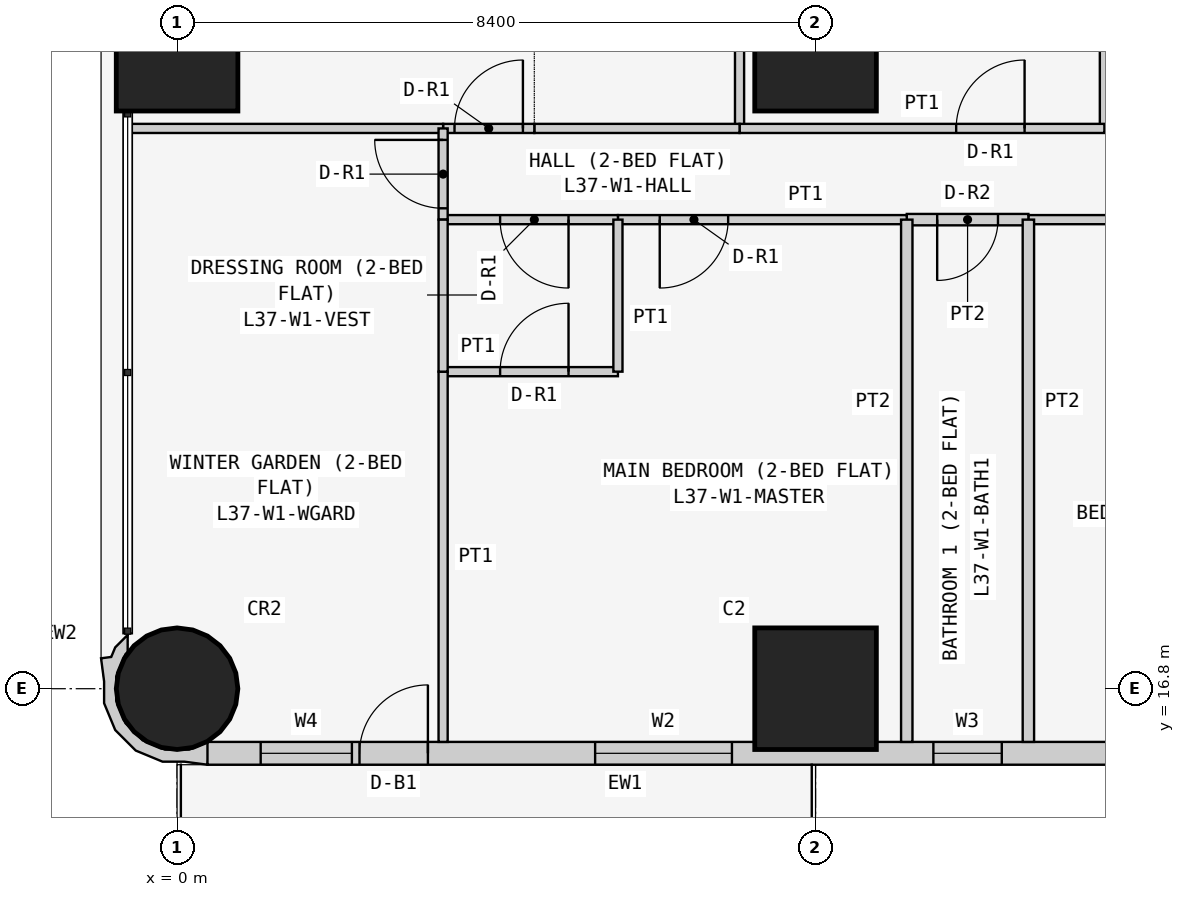
"""IFC4 building model, lengths in metres.
Left out: names, types, materials, properties, quantities, classifications, styles, units other than length and angle.
Written with IfcOpenShell. Run it as: python <this file> out.ifc"""

import sys

from ifc_helpers import new_model, si_unit, direction, frame, frame_2d, origin, origin_2d, place, context, subcontext, project, spatial, polyline, rectangle, circle, outline, extrude, element, fill, save


model = new_model("IFC4")
c1 = context("Model", 3, precision=1e-05, world=origin(), true_north=direction((0.0, 1.0)))
c2 = subcontext(c1, "Body", "Model", "MODEL_VIEW")
j1 = project(units=[si_unit("LENGTHUNIT", "METRE"), si_unit("PLANEANGLEUNIT", "RADIAN")], contexts=[c1])
p1 = place(None, origin())
s1 = spatial("IfcSite", under=j1, at=p1, CompositionType="ELEMENT")
p2 = place(p1, origin())
s2 = spatial("IfcBuilding", under=s1, at=p2, CompositionType="ELEMENT")
p3 = place(p2, frame((0.0, 0.0, 144.9)))
s3 = spatial("IfcBuildingStorey", under=s2, at=p3, CompositionType="ELEMENT", Elevation=144.9)
p4 = place(p3, frame((0.0, 16.8, 0.0), z_axis=(0.0, 0.0, 1.0), x_axis=(1.0, 0.0, 0.0)))
e1 = element("IfcColumn", 1, at=p4, inside=s3, PredefinedType="COLUMN", context=c2, shape_type="SweptSolid", body=[
    extrude(circle(Radius=0.8, at=origin_2d()), origin(), (0.0, 0.0, 1.0), 3.6),
])
for number, where, z_axis, x_axis in (
    (2, (0.0, 25.2, 0.0), (0.0, 0.0, 1.0), (1.0, 0.0, 0.0)),
    (3, (8.4, 16.8, 0.0), (0.0, 0.0, 1.0), (1.0, 0.0, 0.0)),
    (4, (8.4, 25.2, 0.0), (0.0, 0.0, 1.0), (1.0, 0.0, 0.0)),
):
    element("IfcColumn", number, at=place(p3, frame(where, z_axis=z_axis, x_axis=x_axis)), inside=s3, PredefinedType="COLUMN", context=c2, shape_type="SweptSolid", body=[
        extrude(rectangle(XDim=1.6, YDim=1.6, at=origin_2d()), origin(), (0.0, 0.0, 1.0), 3.6),
    ])
p5 = place(p3, frame((0.4, 15.95, 0.0), z_axis=(0.0, 0.0, 1.0), x_axis=(1.0, 0.0, 0.0)))
e5 = element("IfcWall", 5, at=p5, inside=s3, PredefinedType="SOLIDWALL", context=c2, shape_type="SweptSolid", body=[
    extrude(rectangle(XDim=15.7, YDim=0.3, at=frame_2d((7.85, 0.0))), origin(), (0.0, 0.0, 1.0), 3.45),
])
p6 = place(p5, frame((12.4, 0.0, 0.9)))
e6 = element("IfcOpeningElement", 6, at=p6, cuts=e5, PredefinedType="OPENING", context=c2, shape_type="SweptSolid", body=[
    extrude(rectangle(XDim=1.8, YDim=1.5, at=frame_2d((0.9, 0.75))), frame((0.0, 0.16, 0.0), z_axis=(0.0, -1.0, 0.0), x_axis=(1.0, 0.0, 0.0)), (0.0, 0.0, 1.0), 0.32),
])
p7 = place(p5, frame((9.55, 0.0, 1.5)))
e7 = element("IfcOpeningElement", 7, at=p7, cuts=e5, PredefinedType="OPENING", context=c2, shape_type="SweptSolid", body=[
    extrude(rectangle(XDim=0.9, YDim=0.7, at=frame_2d((0.45, 0.35))), frame((0.0, 0.16, 0.0), z_axis=(0.0, -1.0, 0.0), x_axis=(1.0, 0.0, 0.0)), (0.0, 0.0, 1.0), 0.32),
])
p8 = place(p5, frame((5.1, 0.0, 0.9)))
e8 = element("IfcOpeningElement", 8, at=p8, cuts=e5, PredefinedType="OPENING", context=c2, shape_type="SweptSolid", body=[
    extrude(rectangle(XDim=1.8, YDim=1.5, at=frame_2d((0.9, 0.75))), frame((0.0, 0.16, 0.0), z_axis=(0.0, -1.0, 0.0), x_axis=(1.0, 0.0, 0.0)), (0.0, 0.0, 1.0), 0.32),
])
p9 = place(p5, frame((2.0, 0.0, 0.0)))
e9 = element("IfcOpeningElement", 9, at=p9, cuts=e5, PredefinedType="OPENING", context=c2, shape_type="SweptSolid", body=[
    extrude(rectangle(XDim=0.9, YDim=2.4, at=frame_2d((0.45, 1.2))), frame((0.0, 0.16, 0.0), z_axis=(0.0, -1.0, 0.0), x_axis=(1.0, 0.0, 0.0)), (0.0, 0.0, 1.0), 0.32),
])
p10 = place(p5, frame((0.7, 0.0, 0.9)))
e10 = element("IfcOpeningElement", 10, at=p10, cuts=e5, PredefinedType="OPENING", context=c2, shape_type="SweptSolid", body=[
    extrude(rectangle(XDim=1.2, YDim=1.5, at=frame_2d((0.6, 0.75))), frame((0.0, 0.16, 0.0), z_axis=(0.0, -1.0, 0.0), x_axis=(1.0, 0.0, 0.0)), (0.0, 0.0, 1.0), 0.32),
])
p11 = place(p3, frame((-0.595, 17.448, 0.0), z_axis=(0.0, 0.0, 1.0), x_axis=(-0.93923434088, -0.343276641956, 0.0)))
e11 = element("IfcWall", 11, at=p11, inside=s3, PredefinedType="SOLIDWALL", context=c2, shape_type="SweptSolid", body=[
    extrude(outline(polyline([(-0.369, 1.89), (-0.509, 1.621), (-0.491, 1.614), (-0.479, 1.609), (-0.211, 1.62), (0.088, 1.511), (0.323, 1.295), (0.457, 1.006), (0.47, 0.688), (0.361, 0.389), (0.146, 0.154), (0.108, 0.137), (0.031, -0.075), (0.241, 0.023), (0.334, 0.124), (0.465, 0.094), (0.532, 0.393), (0.631, 0.663), (0.614, 1.045), (0.453, 1.391), (0.172, 1.649), (-0.098, 1.748), (-0.369, 1.89)])), origin(), (0.0, 0.0, 1.0), 3.45),
])
for number, where, z_axis, x_axis in (
    (12, (12.2, 29.4, 0.0), (0.0, 0.0, 1.0), (0.0, -1.0, 0.0)),
    (13, (7.4, 29.4, 0.0), (0.0, 0.0, 1.0), (0.0, -1.0, 0.0)),
):
    element("IfcWall", number, at=place(p3, frame(where, z_axis=z_axis, x_axis=x_axis)), inside=s3, PredefinedType="PARTITIONING", context=c2, shape_type="SweptSolid", body=[
        extrude(rectangle(XDim=5.229, YDim=0.12, at=frame_2d((2.615, 0.0))), origin(), (0.0, 0.0, 1.0), 3.45),
    ])
p12 = place(p3, frame((7.4, 24.171, 0.0), z_axis=(0.0, 0.0, 1.0), x_axis=(1.0, 0.0, 0.0)))
e14 = element("IfcWall", 14, at=p12, inside=s3, PredefinedType="PARTITIONING", context=c2, shape_type="SweptSolid", body=[
    extrude(rectangle(XDim=4.8, YDim=0.12, at=frame_2d((2.4, 0.0))), origin(), (0.0, 0.0, 1.0), 3.45),
])
p13 = place(p12, frame((2.85, 0.0, 0.0)))
e15 = element("IfcOpeningElement", 15, at=p13, cuts=e14, PredefinedType="OPENING", context=c2, shape_type="SweptSolid", body=[
    extrude(rectangle(XDim=0.9, YDim=2.1, at=frame_2d((0.45, 1.05))), frame((0.0, 0.07, 0.0), z_axis=(0.0, -1.0, 0.0), x_axis=(1.0, 0.0, 0.0)), (0.0, 0.0, 1.0), 0.14),
])
p14 = place(p3, frame((4.7, 24.171, 0.0), z_axis=(0.0, 0.0, 1.0), x_axis=(1.0, 0.0, 0.0)))
e16 = element("IfcWall", 16, at=p14, inside=s3, PredefinedType="PARTITIONING", context=c2, shape_type="SweptSolid", body=[
    extrude(rectangle(XDim=2.7, YDim=0.12, at=frame_2d((1.35, 0.0))), origin(), (0.0, 0.0, 1.0), 3.45),
])
p15 = place(p3, frame((3.5, 24.171, 0.0), z_axis=(0.0, 0.0, 1.0), x_axis=(1.0, 0.0, 0.0)))
e17 = element("IfcWall", 17, at=p15, inside=s3, PredefinedType="PARTITIONING", context=c2, shape_type="SweptSolid", body=[
    extrude(rectangle(XDim=1.2, YDim=0.12, at=frame_2d((0.6, 0.0))), origin(), (0.0, 0.0, 1.0), 3.45),
])
p16 = place(p15, frame((0.15, 0.0, 0.0)))
e18 = element("IfcOpeningElement", 18, at=p16, cuts=e17, PredefinedType="OPENING", context=c2, shape_type="SweptSolid", body=[
    extrude(rectangle(XDim=0.9, YDim=2.1, at=frame_2d((0.45, 1.05))), frame((0.0, 0.07, 0.0), z_axis=(0.0, -1.0, 0.0), x_axis=(1.0, 0.0, 0.0)), (0.0, 0.0, 1.0), 0.14),
])
p17 = place(p3, frame((-0.65, 24.171, 0.0), z_axis=(0.0, 0.0, 1.0), x_axis=(1.0, 0.0, 0.0)))
e19 = element("IfcWall", 19, at=p17, inside=s3, PredefinedType="PARTITIONING", context=c2, shape_type="SweptSolid", body=[
    extrude(rectangle(XDim=4.15, YDim=0.12, at=frame_2d((2.075, 0.0))), origin(), (0.0, 0.0, 1.0), 3.45),
])
p18 = place(p3, frame((11.2, 22.971, 0.0), z_axis=(0.0, 0.0, 1.0), x_axis=(1.0, 0.0, 0.0)))
e20 = element("IfcWall", 20, at=p18, inside=s3, PredefinedType="PARTITIONING", context=c2, shape_type="SweptSolid", body=[
    extrude(rectangle(XDim=4.675, YDim=0.12, at=frame_2d((2.337, 0.0))), origin(), (0.0, 0.0, 1.0), 3.45),
])
p19 = place(p18, frame((1.85, 0.0, 0.0)))
e21 = element("IfcOpeningElement", 21, at=p19, cuts=e20, PredefinedType="OPENING", context=c2, shape_type="SweptSolid", body=[
    extrude(rectangle(XDim=0.9, YDim=2.1, at=frame_2d((0.45, 1.05))), frame((0.0, 0.07, 0.0), z_axis=(0.0, -1.0, 0.0), x_axis=(1.0, 0.0, 0.0)), (0.0, 0.0, 1.0), 0.14),
])
p20 = place(p3, frame((9.6, 22.971, 0.0), z_axis=(0.0, 0.0, 1.0), x_axis=(1.0, 0.0, 0.0)))
e22 = element("IfcWall", 22, at=p20, inside=s3, PredefinedType="PARTITIONING", context=c2, shape_type="SweptSolid", body=[
    extrude(rectangle(XDim=1.6, YDim=0.15, at=frame_2d((0.8, 0.0))), origin(), (0.0, 0.0, 1.0), 3.45),
])
p21 = place(p20, frame((0.4, 0.0, 0.0)))
e23 = element("IfcOpeningElement", 23, at=p21, cuts=e22, PredefinedType="OPENING", context=c2, shape_type="SweptSolid", body=[
    extrude(rectangle(XDim=0.8, YDim=2.1, at=frame_2d((0.4, 1.05))), frame((0.0, 0.085, 0.0), z_axis=(0.0, -1.0, 0.0), x_axis=(1.0, 0.0, 0.0)), (0.0, 0.0, 1.0), 0.17),
])
p22 = place(p3, frame((5.8, 22.971, 0.0), z_axis=(0.0, 0.0, 1.0), x_axis=(1.0, 0.0, 0.0)))
e24 = element("IfcWall", 24, at=p22, inside=s3, PredefinedType="PARTITIONING", context=c2, shape_type="SweptSolid", body=[
    extrude(rectangle(XDim=3.8, YDim=0.12, at=frame_2d((1.9, 0.0))), origin(), (0.0, 0.0, 1.0), 3.45),
])
p23 = place(p22, frame((0.55, 0.0, 0.0)))
e25 = element("IfcOpeningElement", 25, at=p23, cuts=e24, PredefinedType="OPENING", context=c2, shape_type="SweptSolid", body=[
    extrude(rectangle(XDim=0.9, YDim=2.1, at=frame_2d((0.45, 1.05))), frame((0.0, 0.07, 0.0), z_axis=(0.0, -1.0, 0.0), x_axis=(1.0, 0.0, 0.0)), (0.0, 0.0, 1.0), 0.14),
])
p24 = place(p3, frame((3.5, 22.971, 0.0), z_axis=(0.0, 0.0, 1.0), x_axis=(1.0, 0.0, 0.0)))
e26 = element("IfcWall", 26, at=p24, inside=s3, PredefinedType="PARTITIONING", context=c2, shape_type="SweptSolid", body=[
    extrude(rectangle(XDim=2.3, YDim=0.12, at=frame_2d((1.15, 0.0))), origin(), (0.0, 0.0, 1.0), 3.45),
])
p25 = place(p24, frame((0.75, 0.0, 0.0)))
e27 = element("IfcOpeningElement", 27, at=p25, cuts=e26, PredefinedType="OPENING", context=c2, shape_type="SweptSolid", body=[
    extrude(rectangle(XDim=0.9, YDim=2.1, at=frame_2d((0.45, 1.05))), frame((0.0, 0.07, 0.0), z_axis=(0.0, -1.0, 0.0), x_axis=(1.0, 0.0, 0.0)), (0.0, 0.0, 1.0), 0.14),
])
p26 = place(p3, frame((3.5, 24.171, 0.0), z_axis=(0.0, 0.0, 1.0), x_axis=(0.0, -1.0, 0.0)))
e28 = element("IfcWall", 28, at=p26, inside=s3, PredefinedType="PARTITIONING", context=c2, shape_type="SweptSolid", body=[
    extrude(rectangle(XDim=1.2, YDim=0.12, at=frame_2d((0.6, 0.0))), origin(), (0.0, 0.0, 1.0), 3.45),
])
p27 = place(p26, frame((0.151, 0.0, 0.0)))
e29 = element("IfcOpeningElement", 29, at=p27, cuts=e28, PredefinedType="OPENING", context=c2, shape_type="SweptSolid", body=[
    extrude(rectangle(XDim=0.9, YDim=2.1, at=frame_2d((0.45, 1.05))), frame((0.0, 0.07, 0.0), z_axis=(0.0, -1.0, 0.0), x_axis=(1.0, 0.0, 0.0)), (0.0, 0.0, 1.0), 0.14),
])
for number, where, z_axis, x_axis in (
    (30, (11.2, 22.971, 0.0), (0.0, 0.0, 1.0), (0.0, -1.0, 0.0)),
    (31, (9.6, 22.971, 0.0), (0.0, 0.0, 1.0), (0.0, -1.0, 0.0)),
):
    element("IfcWall", number, at=place(p3, frame(where, z_axis=z_axis, x_axis=x_axis)), inside=s3, PredefinedType="PARTITIONING", context=c2, shape_type="SweptSolid", body=[
        extrude(rectangle(XDim=6.871, YDim=0.15, at=frame_2d((3.436, 0.0))), origin(), (0.0, 0.0, 1.0), 3.45),
    ])
p28 = place(p3, frame((3.5, 20.971, 0.0), z_axis=(0.0, 0.0, 1.0), x_axis=(1.0, 0.0, 0.0)))
e32 = element("IfcWall", 32, at=p28, inside=s3, PredefinedType="PARTITIONING", context=c2, shape_type="SweptSolid", body=[
    extrude(rectangle(XDim=2.3, YDim=0.12, at=frame_2d((1.15, 0.0))), origin(), (0.0, 0.0, 1.0), 3.45),
])
p29 = place(p28, frame((0.75, 0.0, 0.0)))
e33 = element("IfcOpeningElement", 33, at=p29, cuts=e32, PredefinedType="OPENING", context=c2, shape_type="SweptSolid", body=[
    extrude(rectangle(XDim=0.9, YDim=2.1, at=frame_2d((0.45, 1.05))), frame((0.0, 0.07, 0.0), z_axis=(0.0, -1.0, 0.0), x_axis=(1.0, 0.0, 0.0)), (0.0, 0.0, 1.0), 0.14),
])
p30 = place(p3, frame((5.8, 20.971, 0.0), z_axis=(0.0, 0.0, 1.0), x_axis=(0.0, 1.0, 0.0)))
e34 = element("IfcWall", 34, at=p30, inside=s3, PredefinedType="PARTITIONING", context=c2, shape_type="SweptSolid", body=[
    extrude(rectangle(XDim=2.0, YDim=0.12, at=frame_2d((1.0, 0.0))), origin(), (0.0, 0.0, 1.0), 3.45),
])
p31 = place(p3, frame((3.5, 16.1, 0.0), z_axis=(0.0, 0.0, 1.0), x_axis=(0.0, 1.0, 0.0)))
e35 = element("IfcWall", 35, at=p31, inside=s3, PredefinedType="PARTITIONING", context=c2, shape_type="SweptSolid", body=[
    extrude(rectangle(XDim=4.871, YDim=0.12, at=frame_2d((2.436, 0.0))), origin(), (0.0, 0.0, 1.0), 3.45),
])
p32 = place(p3, frame((3.5, 22.971, 0.0), z_axis=(0.0, 0.0, 1.0), x_axis=(0.0, -1.0, 0.0)))
e36 = element("IfcWall", 36, at=p32, inside=s3, PredefinedType="PARTITIONING", context=c2, shape_type="SweptSolid", body=[
    extrude(rectangle(XDim=2.0, YDim=0.12, at=frame_2d((1.0, 0.0))), origin(), (0.0, 0.0, 1.0), 3.45),
])
p33 = place(p7, origin())
e37 = element("IfcWindow", 37, at=p33, inside=s3, PartitioningType="SINGLE_PANEL", PredefinedType="WINDOW", context=c2, shape_type="SweptSolid", body=[
    extrude(rectangle(XDim=0.9, YDim=0.7, at=frame_2d((0.45, 0.35))), frame((0.0, 0.03, 0.0), z_axis=(0.0, -1.0, 0.0), x_axis=(1.0, 0.0, 0.0)), (0.0, 0.0, 1.0), 0.06),
])
fill(e7, e37)
p34 = place(p8, origin())
e38 = element("IfcWindow", 38, at=p34, inside=s3, PartitioningType="SINGLE_PANEL", PredefinedType="WINDOW", context=c2, shape_type="SweptSolid", body=[
    extrude(rectangle(XDim=1.8, YDim=1.5, at=frame_2d((0.9, 0.75))), frame((0.0, 0.03, 0.0), z_axis=(0.0, -1.0, 0.0), x_axis=(1.0, 0.0, 0.0)), (0.0, 0.0, 1.0), 0.06),
])
fill(e8, e38)
p35 = place(p9, origin())
e39 = element("IfcDoor", 39, at=p35, inside=s3, OperationType="SINGLE_SWING_RIGHT", PredefinedType="DOOR", context=c2, shape_type="SweptSolid", body=[
    extrude(rectangle(XDim=0.9, YDim=2.4, at=frame_2d((0.45, 1.2))), frame((0.0, 0.025, 0.0), z_axis=(0.0, -1.0, 0.0), x_axis=(1.0, 0.0, 0.0)), (0.0, 0.0, 1.0), 0.05),
])
fill(e9, e39)
p36 = place(p10, origin())
e40 = element("IfcWindow", 40, at=p36, inside=s3, PartitioningType="SINGLE_PANEL", PredefinedType="WINDOW", context=c2, shape_type="SweptSolid", body=[
    extrude(rectangle(XDim=1.2, YDim=1.5, at=frame_2d((0.6, 0.75))), frame((0.0, 0.03, 0.0), z_axis=(0.0, -1.0, 0.0), x_axis=(1.0, 0.0, 0.0)), (0.0, 0.0, 1.0), 0.06),
])
fill(e10, e40)
p37 = place(p13, origin())
e41 = element("IfcDoor", 41, at=p37, inside=s3, OperationType="SINGLE_SWING_RIGHT", PredefinedType="DOOR", context=c2, shape_type="SweptSolid", body=[
    extrude(rectangle(XDim=0.9, YDim=2.1, at=frame_2d((0.45, 1.05))), frame((0.0, 0.025, 0.0), z_axis=(0.0, -1.0, 0.0), x_axis=(1.0, 0.0, 0.0)), (0.0, 0.0, 1.0), 0.05),
])
fill(e15, e41)
p38 = place(p16, origin())
e42 = element("IfcDoor", 42, at=p38, inside=s3, OperationType="SINGLE_SWING_RIGHT", PredefinedType="DOOR", context=c2, shape_type="SweptSolid", body=[
    extrude(rectangle(XDim=0.9, YDim=2.1, at=frame_2d((0.45, 1.05))), frame((0.0, 0.025, 0.0), z_axis=(0.0, -1.0, 0.0), x_axis=(1.0, 0.0, 0.0)), (0.0, 0.0, 1.0), 0.05),
])
fill(e18, e42)
p39 = place(p21, frame((0.8, 0.0, 0.0), z_axis=(0.0, 0.0, 1.0), x_axis=(-1.0, 0.0, 0.0)))
e43 = element("IfcDoor", 43, at=p39, inside=s3, OperationType="SINGLE_SWING_RIGHT", PredefinedType="DOOR", context=c2, shape_type="SweptSolid", body=[
    extrude(rectangle(XDim=0.8, YDim=2.1, at=frame_2d((0.4, 1.05))), frame((0.0, 0.025, 0.0), z_axis=(0.0, -1.0, 0.0), x_axis=(1.0, 0.0, 0.0)), (0.0, 0.0, 1.0), 0.05),
])
fill(e23, e43)
p40 = place(p23, frame((0.9, 0.0, 0.0), z_axis=(0.0, 0.0, 1.0), x_axis=(-1.0, 0.0, 0.0)))
e44 = element("IfcDoor", 44, at=p40, inside=s3, OperationType="SINGLE_SWING_RIGHT", PredefinedType="DOOR", context=c2, shape_type="SweptSolid", body=[
    extrude(rectangle(XDim=0.9, YDim=2.1, at=frame_2d((0.45, 1.05))), frame((0.0, 0.025, 0.0), z_axis=(0.0, -1.0, 0.0), x_axis=(1.0, 0.0, 0.0)), (0.0, 0.0, 1.0), 0.05),
])
fill(e25, e44)
p41 = place(p25, frame((0.9, 0.0, 0.0), z_axis=(0.0, 0.0, 1.0), x_axis=(-1.0, 0.0, 0.0)))
e45 = element("IfcDoor", 45, at=p41, inside=s3, OperationType="SINGLE_SWING_LEFT", PredefinedType="DOOR", context=c2, shape_type="SweptSolid", body=[
    extrude(rectangle(XDim=0.9, YDim=2.1, at=frame_2d((0.45, 1.05))), frame((0.0, 0.025, 0.0), z_axis=(0.0, -1.0, 0.0), x_axis=(1.0, 0.0, 0.0)), (0.0, 0.0, 1.0), 0.05),
])
fill(e27, e45)
p42 = place(p29, origin())
e46 = element("IfcDoor", 46, at=p42, inside=s3, OperationType="SINGLE_SWING_RIGHT", PredefinedType="DOOR", context=c2, shape_type="SweptSolid", body=[
    extrude(rectangle(XDim=0.9, YDim=2.1, at=frame_2d((0.45, 1.05))), frame((0.0, 0.025, 0.0), z_axis=(0.0, -1.0, 0.0), x_axis=(1.0, 0.0, 0.0)), (0.0, 0.0, 1.0), 0.05),
])
fill(e33, e46)
p43 = place(p27, frame((0.9, 0.0, 0.0), z_axis=(0.0, 0.0, 1.0), x_axis=(-1.0, 0.0, 0.0)))
e47 = element("IfcDoor", 47, at=p43, inside=s3, OperationType="SINGLE_SWING_RIGHT", PredefinedType="DOOR", context=c2, shape_type="SweptSolid", body=[
    extrude(rectangle(XDim=0.9, YDim=2.1, at=frame_2d((0.45, 1.05))), frame((0.0, 0.025, 0.0), z_axis=(0.0, -1.0, 0.0), x_axis=(1.0, 0.0, 0.0)), (0.0, 0.0, 1.0), 0.05),
])
fill(e29, e47)
save(model, sys.argv[1])
